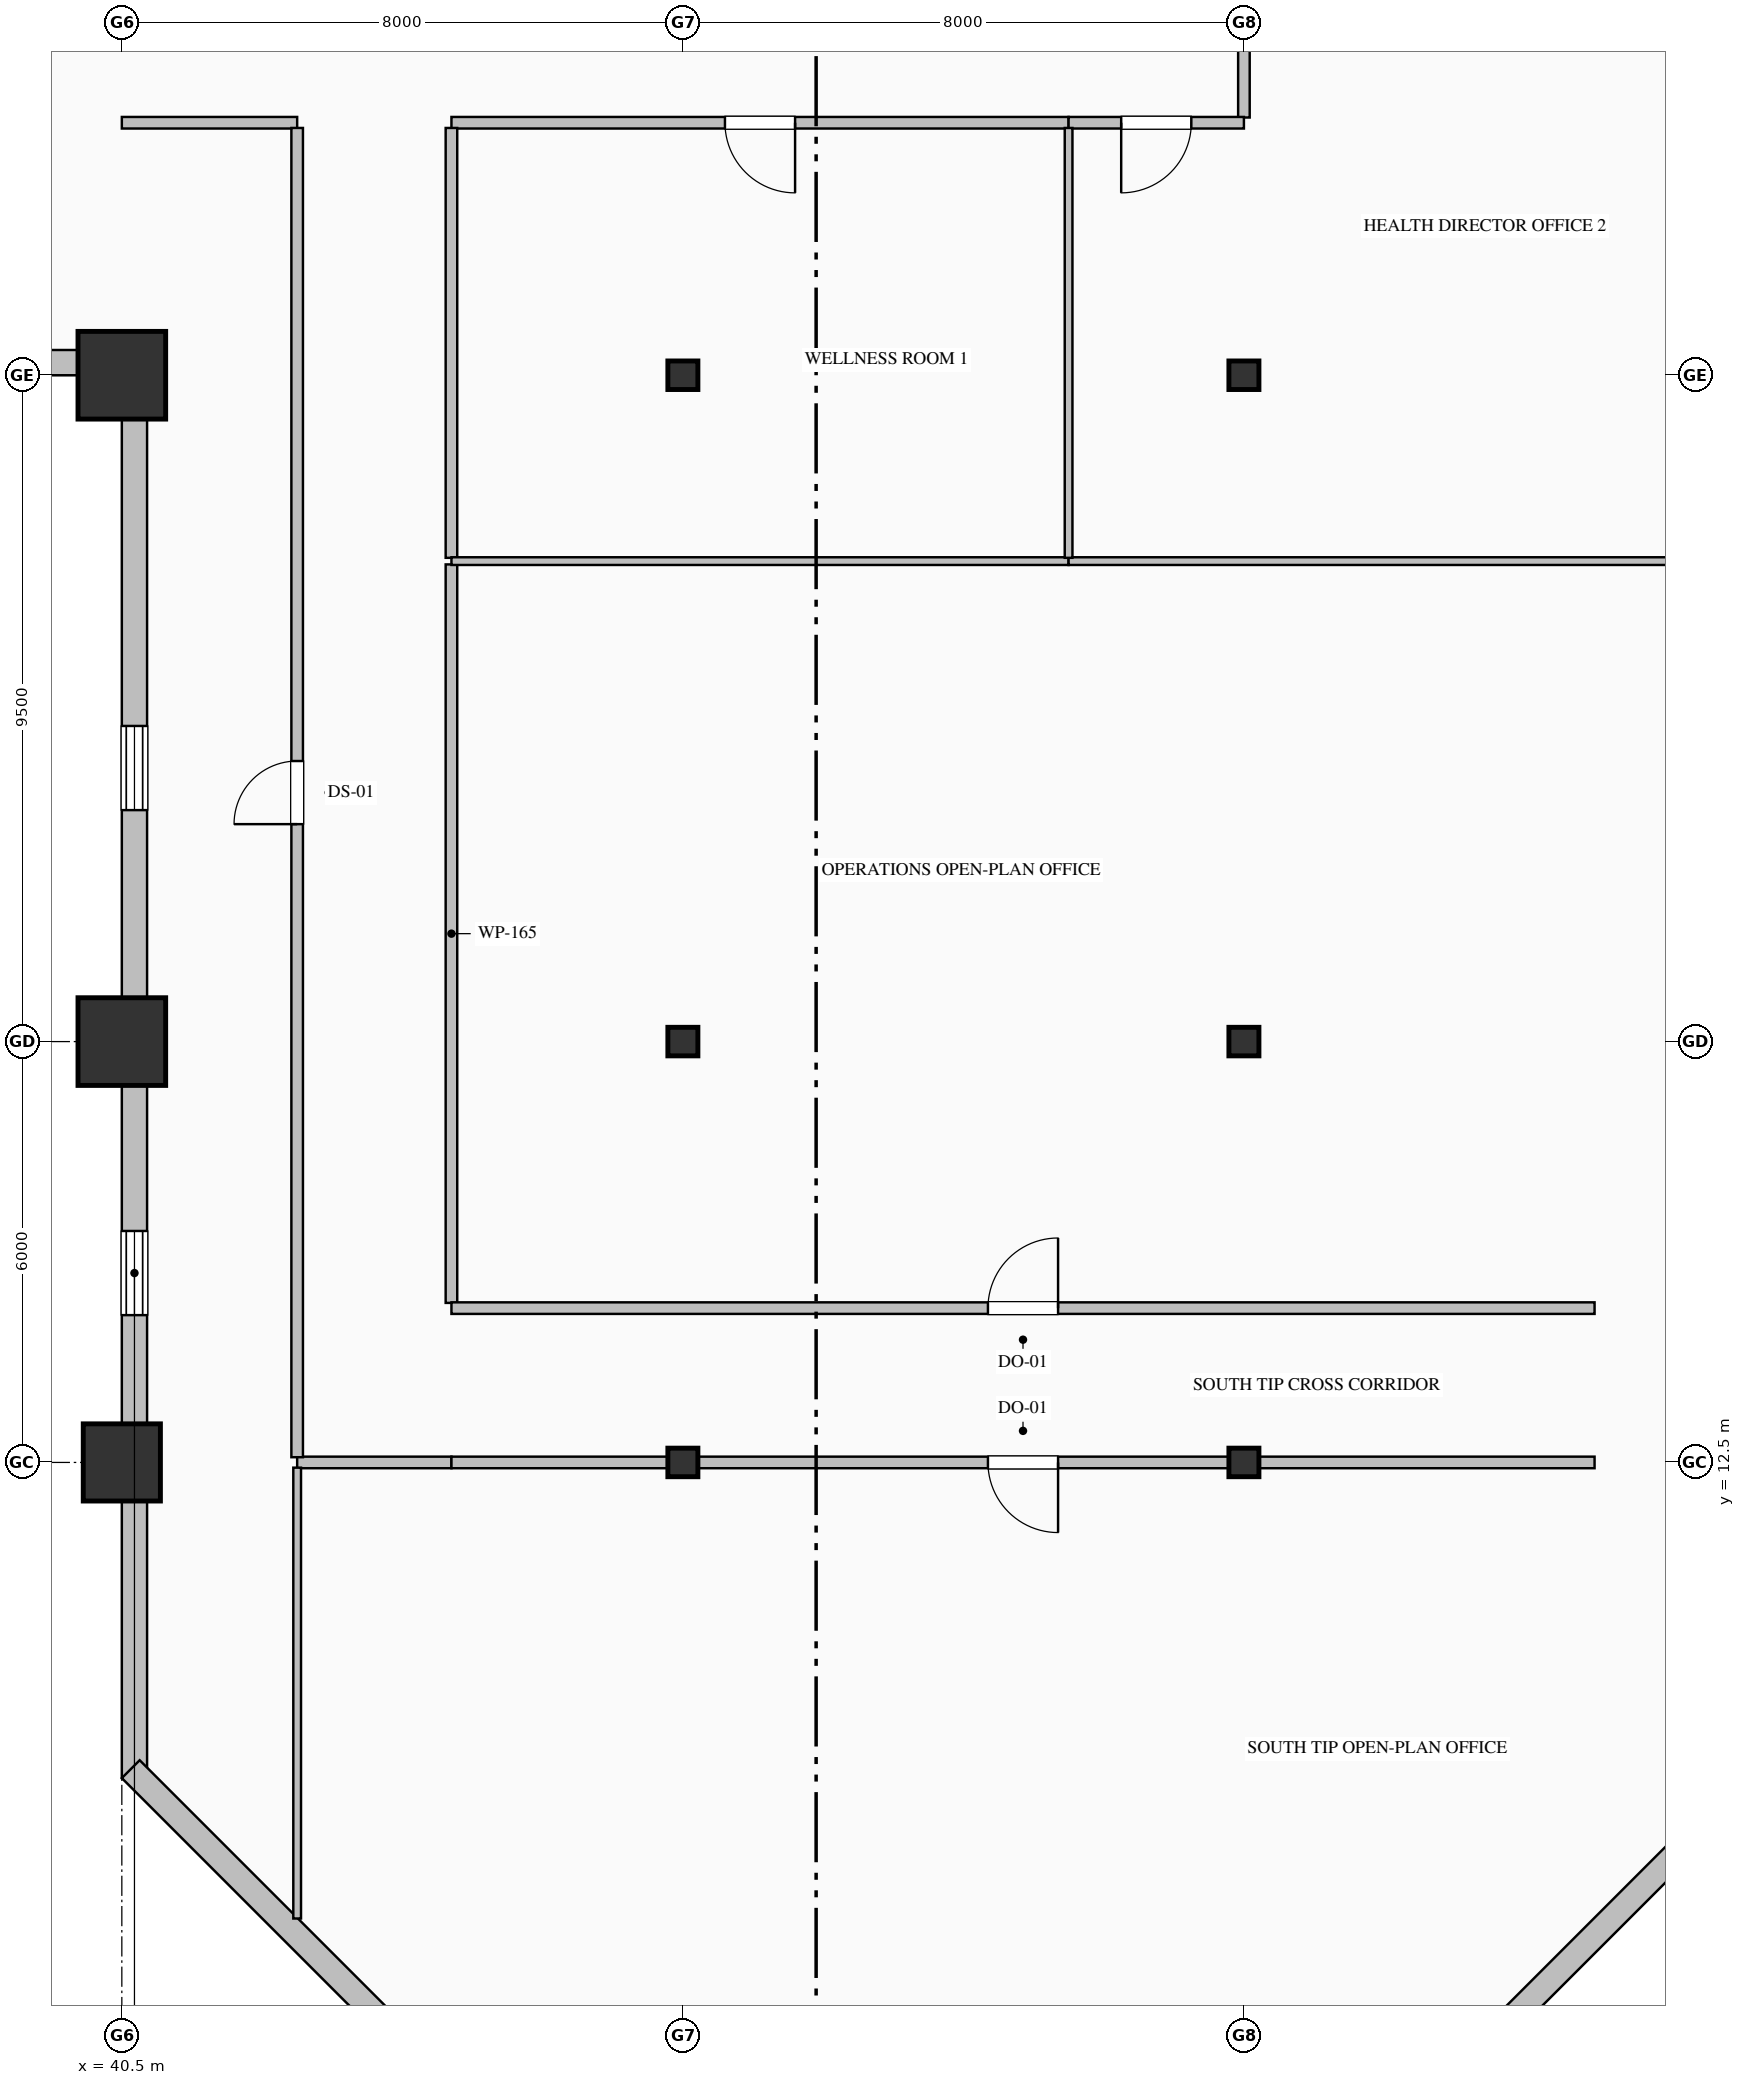
"""IFC4 building model, lengths in metres.
Left out: names, types, materials, properties, quantities, classifications, styles, units other than length and angle.
Written with IfcOpenShell. Run it as: python <this file> out.ifc"""

import sys

from ifc_helpers import new_model, si_unit, direction, frame, frame_2d, origin, origin_2d, place, context, subcontext, project, spatial, rectangle, hollow_rectangle, i_section, extrude, element, fill, save


model = new_model("IFC4")
c1 = context("Model", 3, precision=1e-05, world=origin(), true_north=direction((0.0, 1.0)))
c2 = subcontext(c1, "Body", "Model", "MODEL_VIEW")
j1 = project(units=[si_unit("LENGTHUNIT", "METRE"), si_unit("PLANEANGLEUNIT", "RADIAN")], contexts=[c1])
p1 = place(None, origin())
s1 = spatial("IfcSite", under=j1, at=p1, CompositionType="ELEMENT")
p2 = place(p1, origin())
s2 = spatial("IfcBuilding", under=s1, at=p2, CompositionType="ELEMENT")
p3 = place(p2, frame((0.0, 0.0, 80.2)))
s3 = spatial("IfcBuildingStorey", under=s2, at=p3, CompositionType="ELEMENT", Elevation=80.2)
p4 = place(p3, frame((40.5, 12.5, 0.0), z_axis=(0.0, 0.0, 1.0), x_axis=(1.0, 0.0, 0.0)))
e1 = element("IfcColumn", 1, at=p4, inside=s3, PredefinedType="COLUMN", context=c2, shape_type="SweptSolid", body=[
    extrude(hollow_rectangle(XDim=1.1, YDim=1.1, WallThickness=0.04, at=origin_2d()), origin(), (0.0, 0.0, 1.0), 4.0),
])
for number, where, z_axis, x_axis in (
    (2, (40.5, 18.5, 0.0), (0.0, 0.0, 1.0), (1.0, 0.0, 0.0)),
    (3, (40.5, 28.0, 0.0), (0.0, 0.0, 1.0), (1.0, 0.0, 0.0)),
):
    element("IfcColumn", number, at=place(p3, frame(where, z_axis=z_axis, x_axis=x_axis)), inside=s3, PredefinedType="COLUMN", context=c2, shape_type="SweptSolid", body=[
        extrude(hollow_rectangle(XDim=1.25, YDim=1.25, WallThickness=0.045, at=origin_2d()), origin(), (0.0, 0.0, 1.0), 4.0),
    ])
for number, where, z_axis, x_axis in (
    (4, (48.5, 12.5, 0.0), (0.0, 0.0, 1.0), (1.0, 0.0, 0.0)),
    (5, (48.5, 18.5, 0.0), (0.0, 0.0, 1.0), (1.0, 0.0, 0.0)),
    (6, (48.5, 28.0, 0.0), (0.0, 0.0, 1.0), (1.0, 0.0, 0.0)),
    (7, (56.5, 12.5, 0.0), (0.0, 0.0, 1.0), (1.0, 0.0, 0.0)),
    (8, (56.5, 18.5, 0.0), (0.0, 0.0, 1.0), (1.0, 0.0, 0.0)),
    (9, (56.5, 28.0, 0.0), (0.0, 0.0, 1.0), (1.0, 0.0, 0.0)),
):
    element("IfcColumn", number, at=place(p3, frame(where, z_axis=z_axis, x_axis=x_axis)), inside=s3, PredefinedType="COLUMN", context=c2, shape_type="SweptSolid", body=[
        extrude(i_section(OverallWidth=0.407, OverallDepth=0.428, WebThickness=0.02, FlangeThickness=0.035, FilletRadius=0.022, at=origin_2d()), origin(), (0.0, 0.0, 1.0), 4.0),
    ])
p5 = place(p3, frame((40.68, 8.0, 0.0), z_axis=(0.0, 0.0, 1.0), x_axis=(0.0, 1.0, 0.0)))
e10 = element("IfcWall", 10, at=p5, inside=s3, PredefinedType="SOLIDWALL", context=c2, shape_type="SweptSolid", body=[
    extrude(rectangle(XDim=20.36, YDim=0.36, at=frame_2d((10.18, 0.0))), origin(), (0.0, 0.0, 1.0), 3.05),
])
p6 = place(p5, frame((6.6, 0.0, 0.7)))
e11 = element("IfcOpeningElement", 11, at=p6, cuts=e10, PredefinedType="OPENING", context=c2, shape_type="SweptSolid", body=[
    extrude(rectangle(XDim=1.2, YDim=1.85, at=frame_2d((0.6, 0.925))), frame((0.0, 0.19, 0.0), z_axis=(0.0, -1.0, 0.0), x_axis=(1.0, 0.0, 0.0)), (0.0, 0.0, 1.0), 0.38),
])
p7 = place(p5, frame((13.8, 0.0, 0.7)))
e12 = element("IfcOpeningElement", 12, at=p7, cuts=e10, PredefinedType="OPENING", context=c2, shape_type="SweptSolid", body=[
    extrude(rectangle(XDim=1.2, YDim=1.85, at=frame_2d((0.6, 0.925))), frame((0.0, 0.19, 0.0), z_axis=(0.0, -1.0, 0.0), x_axis=(1.0, 0.0, 0.0)), (0.0, 0.0, 1.0), 0.38),
])
p8 = place(p3, frame((40.52, 28.18, 0.0), z_axis=(0.0, 0.0, 1.0), x_axis=(-1.0, 0.0, 0.0)))
e13 = element("IfcWall", 13, at=p8, inside=s3, PredefinedType="SOLIDWALL", context=c2, shape_type="SweptSolid", body=[
    extrude(rectangle(XDim=36.52, YDim=0.36, at=frame_2d((18.26, 0.0))), origin(), (0.0, 0.0, 1.0), 3.05),
])
p9 = place(p8, frame((10.2, 0.0, 0.7)))
e14 = element("IfcOpeningElement", 14, at=p9, cuts=e13, PredefinedType="OPENING", context=c2, shape_type="SweptSolid", body=[
    extrude(rectangle(XDim=1.2, YDim=1.85, at=frame_2d((0.6, 0.925))), frame((0.0, 0.19, 0.0), z_axis=(0.0, -1.0, 0.0), x_axis=(1.0, 0.0, 0.0)), (0.0, 0.0, 1.0), 0.38),
])
p10 = place(p8, frame((17.4, 0.0, 0.7)))
e15 = element("IfcOpeningElement", 15, at=p10, cuts=e13, PredefinedType="OPENING", context=c2, shape_type="SweptSolid", body=[
    extrude(rectangle(XDim=1.2, YDim=1.85, at=frame_2d((0.6, 0.925))), frame((0.0, 0.19, 0.0), z_axis=(0.0, -1.0, 0.0), x_axis=(1.0, 0.0, 0.0)), (0.0, 0.0, 1.0), 0.38),
])
p11 = place(p8, frame((21.0, 0.0, 0.7)))
e16 = element("IfcOpeningElement", 16, at=p11, cuts=e13, PredefinedType="OPENING", context=c2, shape_type="SweptSolid", body=[
    extrude(rectangle(XDim=1.2, YDim=1.85, at=frame_2d((0.6, 0.925))), frame((0.0, 0.19, 0.0), z_axis=(0.0, -1.0, 0.0), x_axis=(1.0, 0.0, 0.0)), (0.0, 0.0, 1.0), 0.38),
])
p12 = place(p8, frame((28.2, 0.0, 0.7)))
e17 = element("IfcOpeningElement", 17, at=p12, cuts=e13, PredefinedType="OPENING", context=c2, shape_type="SweptSolid", body=[
    extrude(rectangle(XDim=1.2, YDim=1.85, at=frame_2d((0.6, 0.925))), frame((0.0, 0.19, 0.0), z_axis=(0.0, -1.0, 0.0), x_axis=(1.0, 0.0, 0.0)), (0.0, 0.0, 1.0), 0.38),
])
for number, where, z_axis, x_axis in (
    (18, (63.873, 8.127, 0.0), (0.0, 0.0, 1.0), (-0.707, -0.707, 0.0)),
    (19, (44.627, 4.127, 0.0), (0.0, 0.0, 1.0), (-0.707, 0.707, 0.0)),
):
    element("IfcWall", number, at=place(p3, frame(where, z_axis=z_axis, x_axis=x_axis)), inside=s3, PredefinedType="SOLIDWALL", context=c2, shape_type="SweptSolid", body=[
        extrude(rectangle(XDim=5.657, YDim=0.36, at=frame_2d((2.828, 0.0))), origin(), (0.0, 0.0, 1.0), 3.75),
    ])
p13 = place(p3, frame((54.0, 31.6, 0.0), z_axis=(0.0, 0.0, 1.0), x_axis=(-1.0, 0.0, 0.0)))
e20 = element("IfcWall", 20, at=p13, inside=s3, PredefinedType="PARTITIONING", context=c2, shape_type="SweptSolid", body=[
    extrude(rectangle(XDim=8.8, YDim=0.165, at=frame_2d((4.4, 0.0))), origin(), (0.0, 0.0, 1.0), 3.75),
])
p14 = place(p13, frame((3.9, 0.0, 0.0)))
e21 = element("IfcOpeningElement", 21, at=p14, cuts=e20, PredefinedType="OPENING", context=c2, shape_type="SweptSolid", body=[
    extrude(rectangle(XDim=1.0, YDim=2.15, at=frame_2d((0.5, 1.075))), frame((0.0, 0.093, 0.0), z_axis=(0.0, -1.0, 0.0), x_axis=(1.0, 0.0, 0.0)), (0.0, 0.0, 1.0), 0.185),
])
p15 = place(p3, frame((56.5, 33.726, 0.0), z_axis=(0.0, 0.0, 1.0), x_axis=(0.0, -1.0, 0.0)))
e22 = element("IfcWall", 22, at=p15, inside=s3, PredefinedType="PARTITIONING", context=c2, shape_type="SweptSolid", body=[
    extrude(rectangle(XDim=2.051, YDim=0.165, at=frame_2d((1.025, 0.0))), origin(), (0.0, 0.0, 1.0), 3.042),
])
p16 = place(p3, frame((56.5, 31.6, 0.0), z_axis=(0.0, 0.0, 1.0), x_axis=(-1.0, 0.0, 0.0)))
e23 = element("IfcWall", 23, at=p16, inside=s3, PredefinedType="PARTITIONING", context=c2, shape_type="SweptSolid", body=[
    extrude(rectangle(XDim=2.5, YDim=0.165, at=frame_2d((1.25, 0.0))), origin(), (0.0, 0.0, 1.0), 3.75),
])
p17 = place(p16, frame((0.75, 0.0, 0.0)))
e24 = element("IfcOpeningElement", 24, at=p17, cuts=e23, PredefinedType="OPENING", context=c2, shape_type="SweptSolid", body=[
    extrude(rectangle(XDim=1.0, YDim=2.15, at=frame_2d((0.5, 1.075))), frame((0.0, 0.093, 0.0), z_axis=(0.0, -1.0, 0.0), x_axis=(1.0, 0.0, 0.0)), (0.0, 0.0, 1.0), 0.185),
])
p18 = place(p3, frame((43.0, 31.6, 0.0), z_axis=(0.0, 0.0, 1.0), x_axis=(-1.0, 0.0, 0.0)))
e25 = element("IfcWall", 25, at=p18, inside=s3, PredefinedType="PARTITIONING", context=c2, shape_type="SweptSolid", body=[
    extrude(rectangle(XDim=2.5, YDim=0.165, at=frame_2d((1.25, 0.0))), origin(), (0.0, 0.0, 1.0), 3.75),
])
p19 = place(p3, frame((45.2, 12.5, 0.0), z_axis=(0.0, 0.0, 1.0), x_axis=(-1.0, 0.0, 0.0)))
e26 = element("IfcWall", 26, at=p19, inside=s3, PredefinedType="PARTITIONING", context=c2, shape_type="SweptSolid", body=[
    extrude(rectangle(XDim=2.2, YDim=0.165, at=frame_2d((1.1, 0.0))), origin(), (0.0, 0.0, 1.0), 3.042),
])
p20 = place(p3, frame((45.2, 25.303, 0.0), z_axis=(0.0, 0.0, 1.0), x_axis=(0.0, -1.0, 0.0)))
e27 = element("IfcWall", 27, at=p20, inside=s3, PredefinedType="PARTITIONING", context=c2, shape_type="SweptSolid", body=[
    extrude(rectangle(XDim=10.529, YDim=0.165, at=frame_2d((5.264, 0.0))), origin(), (0.0, 0.0, 1.0), 3.75),
])
p21 = place(p3, frame((45.2, 31.525, 0.0), z_axis=(0.0, 0.0, 1.0), x_axis=(0.0, -1.0, 0.0)))
e28 = element("IfcWall", 28, at=p21, inside=s3, PredefinedType="PARTITIONING", context=c2, shape_type="SweptSolid", body=[
    extrude(rectangle(XDim=6.128, YDim=0.165, at=frame_2d((3.064, 0.0))), origin(), (0.0, 0.0, 1.0), 3.75),
])
p22 = place(p3, frame((43.0, 12.574, 0.0), z_axis=(0.0, 0.0, 1.0), x_axis=(0.0, 1.0, 0.0)))
e29 = element("IfcWall", 29, at=p22, inside=s3, PredefinedType="PARTITIONING", context=c2, shape_type="SweptSolid", body=[
    extrude(rectangle(XDim=18.951, YDim=0.165, at=frame_2d((9.476, 0.0))), origin(), (0.0, 0.0, 1.0), 3.75),
])
p23 = place(p22, frame((9.025, 0.0, 0.0)))
e30 = element("IfcOpeningElement", 30, at=p23, cuts=e29, PredefinedType="OPENING", context=c2, shape_type="SweptSolid", body=[
    extrude(rectangle(XDim=0.9, YDim=2.15, at=frame_2d((0.45, 1.075))), frame((0.0, 0.093, 0.0), z_axis=(0.0, -1.0, 0.0), x_axis=(1.0, 0.0, 0.0)), (0.0, 0.0, 1.0), 0.185),
])
p24 = place(p3, frame((61.5, 12.5, 0.0), z_axis=(0.0, 0.0, 1.0), x_axis=(-1.0, 0.0, 0.0)))
e31 = element("IfcWall", 31, at=p24, inside=s3, PredefinedType="PARTITIONING", context=c2, shape_type="SweptSolid", body=[
    extrude(rectangle(XDim=16.3, YDim=0.165, at=frame_2d((8.15, 0.0))), origin(), (0.0, 0.0, 1.0), 3.042),
])
p25 = place(p24, frame((7.65, 0.0, 0.0)))
e32 = element("IfcOpeningElement", 32, at=p25, cuts=e31, PredefinedType="OPENING", context=c2, shape_type="SweptSolid", body=[
    extrude(rectangle(XDim=1.0, YDim=2.15, at=frame_2d((0.5, 1.075))), frame((0.0, 0.093, 0.0), z_axis=(0.0, -1.0, 0.0), x_axis=(1.0, 0.0, 0.0)), (0.0, 0.0, 1.0), 0.185),
])
p26 = place(p3, frame((45.2, 14.7, 0.0), z_axis=(0.0, 0.0, 1.0), x_axis=(1.0, 0.0, 0.0)))
e33 = element("IfcWall", 33, at=p26, inside=s3, PredefinedType="PARTITIONING", context=c2, shape_type="SweptSolid", body=[
    extrude(rectangle(XDim=16.3, YDim=0.165, at=frame_2d((8.15, 0.0))), origin(), (0.0, 0.0, 1.0), 3.75),
])
p27 = place(p26, frame((7.65, 0.0, 0.0)))
e34 = element("IfcOpeningElement", 34, at=p27, cuts=e33, PredefinedType="OPENING", context=c2, shape_type="SweptSolid", body=[
    extrude(rectangle(XDim=1.0, YDim=2.15, at=frame_2d((0.5, 1.075))), frame((0.0, 0.093, 0.0), z_axis=(0.0, -1.0, 0.0), x_axis=(1.0, 0.0, 0.0)), (0.0, 0.0, 1.0), 0.185),
])
p28 = place(p3, frame((43.0, 5.998, 0.0), z_axis=(0.0, 0.0, 1.0), x_axis=(0.0, 1.0, 0.0)))
e35 = element("IfcWall", 35, at=p28, inside=s3, PredefinedType="MOVABLE", context=c2, shape_type="SweptSolid", body=[
    extrude(rectangle(XDim=6.428, YDim=0.11, at=frame_2d((3.214, 0.0))), origin(), (0.0, 0.0, 1.0), 3.75),
])
p29 = place(p3, frame((45.2, 25.35, 0.0), z_axis=(0.0, 0.0, 1.0), x_axis=(1.0, 0.0, 0.0)))
e36 = element("IfcWall", 36, at=p29, inside=s3, PredefinedType="MOVABLE", context=c2, shape_type="SweptSolid", body=[
    extrude(rectangle(XDim=8.8, YDim=0.11, at=frame_2d((4.4, 0.0))), origin(), (0.0, 0.0, 1.0), 3.75),
])
p30 = place(p3, frame((54.0, 25.35, 0.0), z_axis=(0.0, 0.0, 1.0), x_axis=(1.0, 0.0, 0.0)))
e37 = element("IfcWall", 37, at=p30, inside=s3, PredefinedType="MOVABLE", context=c2, shape_type="SweptSolid", body=[
    extrude(rectangle(XDim=9.648, YDim=0.11, at=frame_2d((4.824, 0.0))), origin(), (0.0, 0.0, 1.0), 3.75),
])
p31 = place(p3, frame((54.0, 31.525, 0.0), z_axis=(0.0, 0.0, 1.0), x_axis=(0.0, -1.0, 0.0)))
e38 = element("IfcWall", 38, at=p31, inside=s3, PredefinedType="MOVABLE", context=c2, shape_type="SweptSolid", body=[
    extrude(rectangle(XDim=6.128, YDim=0.11, at=frame_2d((3.064, 0.0))), origin(), (0.0, 0.0, 1.0), 3.75),
])
p32 = place(p6, origin())
e39 = element("IfcWindow", 39, at=p32, inside=s3, PartitioningType="DOUBLE_PANEL_VERTICAL", PredefinedType="WINDOW", context=c2, shape_type="SweptSolid", body=[
    extrude(rectangle(XDim=1.2, YDim=1.85, at=frame_2d((0.6, 0.925))), frame((0.0, 0.15, 0.0), z_axis=(0.0, -1.0, 0.0), x_axis=(1.0, 0.0, 0.0)), (0.0, 0.0, 1.0), 0.06),
])
fill(e11, e39)
p33 = place(p7, origin())
e40 = element("IfcWindow", 40, at=p33, inside=s3, PartitioningType="DOUBLE_PANEL_VERTICAL", PredefinedType="WINDOW", context=c2, shape_type="SweptSolid", body=[
    extrude(rectangle(XDim=1.2, YDim=1.85, at=frame_2d((0.6, 0.925))), frame((0.0, 0.15, 0.0), z_axis=(0.0, -1.0, 0.0), x_axis=(1.0, 0.0, 0.0)), (0.0, 0.0, 1.0), 0.06),
])
fill(e12, e40)
p34 = place(p25, origin())
e41 = element("IfcDoor", 41, at=p34, inside=s3, OperationType="SINGLE_SWING_LEFT", PredefinedType="DOOR", context=c2, shape_type="SweptSolid", body=[
    extrude(rectangle(XDim=1.0, YDim=2.15, at=frame_2d((0.5, 1.075))), frame((0.0, 0.025, 0.0), z_axis=(0.0, -1.0, 0.0), x_axis=(1.0, 0.0, 0.0)), (0.0, 0.0, 1.0), 0.05),
])
fill(e32, e41)
p35 = place(p27, origin())
e42 = element("IfcDoor", 42, at=p35, inside=s3, OperationType="SINGLE_SWING_RIGHT", PredefinedType="DOOR", context=c2, shape_type="SweptSolid", body=[
    extrude(rectangle(XDim=1.0, YDim=2.15, at=frame_2d((0.5, 1.075))), frame((0.0, 0.025, 0.0), z_axis=(0.0, -1.0, 0.0), x_axis=(1.0, 0.0, 0.0)), (0.0, 0.0, 1.0), 0.05),
])
fill(e34, e42)
p36 = place(p14, origin())
e43 = element("IfcDoor", 43, at=p36, inside=s3, OperationType="SINGLE_SWING_LEFT", PredefinedType="DOOR", context=c2, shape_type="SweptSolid", body=[
    extrude(rectangle(XDim=1.0, YDim=2.15, at=frame_2d((0.5, 1.075))), frame((0.0, 0.025, 0.0), z_axis=(0.0, -1.0, 0.0), x_axis=(1.0, 0.0, 0.0)), (0.0, 0.0, 1.0), 0.05),
])
fill(e21, e43)
p37 = place(p17, origin())
e44 = element("IfcDoor", 44, at=p37, inside=s3, OperationType="SINGLE_SWING_RIGHT", PredefinedType="DOOR", context=c2, shape_type="SweptSolid", body=[
    extrude(rectangle(XDim=1.0, YDim=2.15, at=frame_2d((0.5, 1.075))), frame((0.0, 0.025, 0.0), z_axis=(0.0, -1.0, 0.0), x_axis=(1.0, 0.0, 0.0)), (0.0, 0.0, 1.0), 0.05),
])
fill(e24, e44)
p38 = place(p23, origin())
e45 = element("IfcDoor", 45, at=p38, inside=s3, OperationType="SINGLE_SWING_LEFT", PredefinedType="DOOR", context=c2, shape_type="SweptSolid", body=[
    extrude(rectangle(XDim=0.9, YDim=2.15, at=frame_2d((0.45, 1.075))), frame((0.0, 0.025, 0.0), z_axis=(0.0, -1.0, 0.0), x_axis=(1.0, 0.0, 0.0)), (0.0, 0.0, 1.0), 0.05),
])
fill(e30, e45)
save(model, sys.argv[1])
